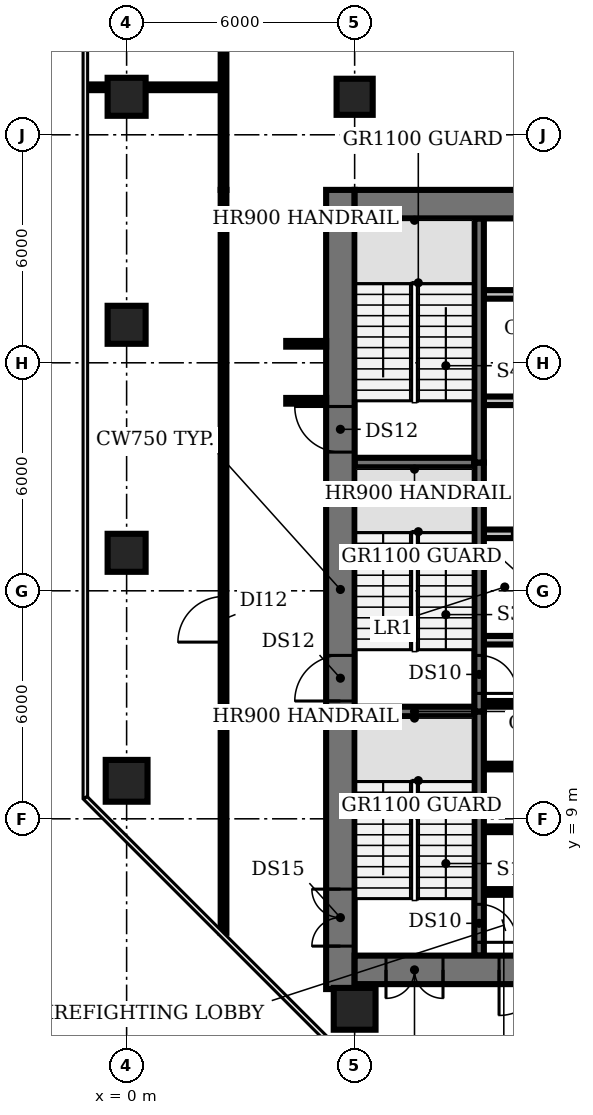
"""IFC4 building model, lengths in metres.
Left out: names, types, materials, properties, quantities, classifications, styles, units other than length and angle.
Written with IfcOpenShell. Run it as: python <this file> out.ifc"""

import sys

from ifc_helpers import new_model, si_unit, direction, frame, frame_2d, origin, origin_2d, place, context, subcontext, project, spatial, rectangle, circle, extrude, element, fill, save


model = new_model("IFC4")
c1 = context("Model", 3, precision=1e-05, world=origin(), true_north=direction((0.0, 1.0)))
c2 = subcontext(c1, "Body", "Model", "MODEL_VIEW")
j1 = project(units=[si_unit("LENGTHUNIT", "METRE"), si_unit("PLANEANGLEUNIT", "RADIAN")], contexts=[c1])
p1 = place(None, origin())
s1 = spatial("IfcSite", under=j1, at=p1, CompositionType="ELEMENT")
p2 = place(p1, origin())
s2 = spatial("IfcBuilding", under=s1, at=p2, CompositionType="ELEMENT")
p3 = place(p2, frame((0.0, 0.0, 87.8)))
s3 = spatial("IfcBuildingStorey", under=s2, at=p3, CompositionType="ELEMENT", Elevation=87.8)
p4 = place(p3, frame((0.0, 10.0, -0.35), z_axis=(0.0, 0.0, 1.0), x_axis=(1.0, 0.0, 0.0)))
e1 = element("IfcColumn", 1, at=p4, inside=s3, PredefinedType="COLUMN", context=c2, shape_type="SweptSolid", body=[
    extrude(circle(Radius=0.55, at=origin_2d()), origin(), (0.0, 0.0, 1.0), 4.2),
])
for number, where, z_axis, x_axis in (
    (2, (0.0, 16.0, -0.35), (0.0, 0.0, 1.0), (1.0, 0.0, 0.0)),
    (3, (0.0, 22.0, -0.35), (0.0, 0.0, 1.0), (1.0, 0.0, 0.0)),
    (4, (0.0, 28.0, -0.35), (0.0, 0.0, 1.0), (1.0, 0.0, 0.0)),
):
    element("IfcColumn", number, at=place(p3, frame(where, z_axis=z_axis, x_axis=x_axis)), inside=s3, PredefinedType="COLUMN", context=c2, shape_type="SweptSolid", body=[
        extrude(rectangle(XDim=1.0, YDim=1.0, at=origin_2d()), origin(), (0.0, 0.0, 1.0), 4.2),
    ])
p5 = place(p3, frame((6.0, 4.0, -0.35), z_axis=(0.0, 0.0, 1.0), x_axis=(1.0, 0.0, 0.0)))
e5 = element("IfcColumn", 5, at=p5, inside=s3, PredefinedType="COLUMN", context=c2, shape_type="SweptSolid", body=[
    extrude(circle(Radius=0.55, at=origin_2d()), origin(), (0.0, 0.0, 1.0), 4.2),
])
p6 = place(p3, frame((6.0, 28.0, -0.35), z_axis=(0.0, 0.0, 1.0), x_axis=(1.0, 0.0, 0.0)))
e6 = element("IfcColumn", 6, at=p6, inside=s3, PredefinedType="COLUMN", context=c2, shape_type="SweptSolid", body=[
    extrude(rectangle(XDim=0.95, YDim=0.95, at=origin_2d()), origin(), (0.0, 0.0, 1.0), 4.2),
])
for number, where, z_axis, x_axis in (
    (7, (9.4, 7.075, 0.0), (0.0, 0.0, 1.0), (1.0, 0.0, 0.0)),
    (8, (9.4, 8.725, 0.0), (0.0, 0.0, 1.0), (1.0, 0.0, 0.0)),
    (9, (9.4, 10.375, 0.0), (0.0, 0.0, 1.0), (1.0, 0.0, 0.0)),
):
    element("IfcWall", number, at=place(p3, frame(where, z_axis=z_axis, x_axis=x_axis)), inside=s3, PredefinedType="SHEAR", context=c2, shape_type="SweptSolid", body=[
        extrude(rectangle(XDim=1.05, YDim=0.15, at=frame_2d((0.525, 0.0))), origin(), (0.0, 0.0, 1.0), 3.85),
    ])
p7 = place(p3, frame((6.0, 11.825, 0.0), z_axis=(0.0, 0.0, 1.0), x_axis=(1.0, 0.0, 0.0)))
e10 = element("IfcWall", 10, at=p7, inside=s3, PredefinedType="SHEAR", context=c2, shape_type="SweptSolid", body=[
    extrude(rectangle(XDim=3.15, YDim=0.25, at=frame_2d((1.575, 0.0))), origin(), (0.0, 0.0, 1.0), 3.85),
])
p8 = place(p3, frame((9.4, 12.025, 0.0), z_axis=(0.0, 0.0, 1.0), x_axis=(1.0, 0.0, 0.0)))
e11 = element("IfcWall", 11, at=p8, inside=s3, PredefinedType="SHEAR", context=c2, shape_type="SweptSolid", body=[
    extrude(rectangle(XDim=1.05, YDim=0.15, at=frame_2d((0.525, 0.0))), origin(), (0.0, 0.0, 1.0), 3.85),
])
p9 = place(p3, frame((9.4, 13.7, 0.0), z_axis=(0.0, 0.0, 1.0), x_axis=(1.0, 0.0, 0.0)))
e12 = element("IfcWall", 12, at=p9, inside=s3, PredefinedType="PARTITIONING", context=c2, shape_type="SweptSolid", body=[
    extrude(rectangle(XDim=4.0, YDim=0.225, at=frame_2d((2.0, 0.0))), origin(), (0.0, 0.0, 1.0), 3.85),
])
p10 = place(p3, frame((9.4, 16.5, 0.0), z_axis=(0.0, 0.0, 1.0), x_axis=(1.0, 0.0, 0.0)))
e13 = element("IfcWall", 13, at=p10, inside=s3, PredefinedType="PARTITIONING", context=c2, shape_type="SweptSolid", body=[
    extrude(rectangle(XDim=14.6, YDim=0.225, at=frame_2d((7.3, 0.0))), origin(), (0.0, 0.0, 1.0), 3.85),
])
p11 = place(p10, frame((0.75, 0.0, 0.0)))
e14 = element("IfcOpeningElement", 14, at=p11, cuts=e13, PredefinedType="OPENING", context=c2, shape_type="SweptSolid", body=[
    extrude(rectangle(XDim=1.1, YDim=2.1, at=frame_2d((0.55, 1.05))), frame((0.0, 0.123, 0.0), z_axis=(0.0, -1.0, 0.0), x_axis=(1.0, 0.0, 0.0)), (0.0, 0.0, 1.0), 0.245),
])
p12 = place(p10, frame((3.55, 0.0, 0.0)))
e15 = element("IfcOpeningElement", 15, at=p12, cuts=e13, PredefinedType="OPENING", context=c2, shape_type="SweptSolid", body=[
    extrude(rectangle(XDim=1.1, YDim=2.1, at=frame_2d((0.55, 1.05))), frame((0.0, 0.123, 0.0), z_axis=(0.0, -1.0, 0.0), x_axis=(1.0, 0.0, 0.0)), (0.0, 0.0, 1.0), 0.245),
])
p13 = place(p10, frame((6.35, 0.0, 0.0)))
e16 = element("IfcOpeningElement", 16, at=p13, cuts=e13, PredefinedType="OPENING", context=c2, shape_type="SweptSolid", body=[
    extrude(rectangle(XDim=1.1, YDim=2.1, at=frame_2d((0.55, 1.05))), frame((0.0, 0.123, 0.0), z_axis=(0.0, -1.0, 0.0), x_axis=(1.0, 0.0, 0.0)), (0.0, 0.0, 1.0), 0.245),
])
p14 = place(p10, frame((9.15, 0.0, 0.0)))
e17 = element("IfcOpeningElement", 17, at=p14, cuts=e13, PredefinedType="OPENING", context=c2, shape_type="SweptSolid", body=[
    extrude(rectangle(XDim=1.1, YDim=2.1, at=frame_2d((0.55, 1.05))), frame((0.0, 0.123, 0.0), z_axis=(0.0, -1.0, 0.0), x_axis=(1.0, 0.0, 0.0)), (0.0, 0.0, 1.0), 0.245),
])
p15 = place(p10, frame((12.4, 0.0, 0.0)))
e18 = element("IfcOpeningElement", 18, at=p15, cuts=e13, PredefinedType="OPENING", context=c2, shape_type="SweptSolid", body=[
    extrude(rectangle(XDim=1.0, YDim=2.1, at=frame_2d((0.5, 1.05))), frame((0.0, 0.123, 0.0), z_axis=(0.0, -1.0, 0.0), x_axis=(1.0, 0.0, 0.0)), (0.0, 0.0, 1.0), 0.245),
])
p16 = place(p3, frame((6.0, 18.375, 0.0), z_axis=(0.0, 0.0, 1.0), x_axis=(1.0, 0.0, 0.0)))
e19 = element("IfcWall", 19, at=p16, inside=s3, PredefinedType="SHEAR", context=c2, shape_type="SweptSolid", body=[
    extrude(rectangle(XDim=3.15, YDim=0.25, at=frame_2d((1.575, 0.0))), origin(), (0.0, 0.0, 1.0), 3.85),
])
p17 = place(p3, frame((24.0, 20.0, 0.0), z_axis=(0.0, 0.0, 1.0), x_axis=(-1.0, 0.0, 0.0)))
e20 = element("IfcWall", 20, at=p17, inside=s3, PredefinedType="PARTITIONING", context=c2, shape_type="SweptSolid", body=[
    extrude(rectangle(XDim=14.6, YDim=0.225, at=frame_2d((7.3, 0.0))), origin(), (0.0, 0.0, 1.0), 3.85),
])
p18 = place(p17, frame((12.2, 0.0, 0.0)))
e21 = element("IfcOpeningElement", 21, at=p18, cuts=e20, PredefinedType="OPENING", context=c2, shape_type="SweptSolid", body=[
    extrude(rectangle(XDim=1.0, YDim=2.1, at=frame_2d((0.5, 1.05))), frame((0.0, 0.123, 0.0), z_axis=(0.0, -1.0, 0.0), x_axis=(1.0, 0.0, 0.0)), (0.0, 0.0, 1.0), 0.245),
])
p19 = place(p17, frame((9.025, 0.0, 0.0)))
e22 = element("IfcOpeningElement", 22, at=p19, cuts=e20, PredefinedType="OPENING", context=c2, shape_type="SweptSolid", body=[
    extrude(rectangle(XDim=0.9, YDim=2.1, at=frame_2d((0.45, 1.05))), frame((0.0, 0.123, 0.0), z_axis=(0.0, -1.0, 0.0), x_axis=(1.0, 0.0, 0.0)), (0.0, 0.0, 1.0), 0.245),
])
p20 = place(p17, frame((5.375, 0.0, 0.0)))
e23 = element("IfcOpeningElement", 23, at=p20, cuts=e20, PredefinedType="OPENING", context=c2, shape_type="SweptSolid", body=[
    extrude(rectangle(XDim=1.0, YDim=2.1, at=frame_2d((0.5, 1.05))), frame((0.0, 0.123, 0.0), z_axis=(0.0, -1.0, 0.0), x_axis=(1.0, 0.0, 0.0)), (0.0, 0.0, 1.0), 0.245),
])
p21 = place(p17, frame((1.2, 0.0, 0.0)))
e24 = element("IfcOpeningElement", 24, at=p21, cuts=e20, PredefinedType="OPENING", context=c2, shape_type="SweptSolid", body=[
    extrude(rectangle(XDim=1.0, YDim=2.1, at=frame_2d((0.5, 1.05))), frame((0.0, 0.123, 0.0), z_axis=(0.0, -1.0, 0.0), x_axis=(1.0, 0.0, 0.0)), (0.0, 0.0, 1.0), 0.245),
])
p22 = place(p3, frame((9.4, 22.8, 0.0), z_axis=(0.0, 0.0, 1.0), x_axis=(1.0, 0.0, 0.0)))
e25 = element("IfcWall", 25, at=p22, inside=s3, PredefinedType="PARTITIONING", context=c2, shape_type="SweptSolid", body=[
    extrude(rectangle(XDim=14.6, YDim=0.225, at=frame_2d((7.3, 0.0))), origin(), (0.0, 0.0, 1.0), 3.85),
])
p23 = place(p3, frame((9.275, 11.825, 0.0), z_axis=(0.0, 0.0, 1.0), x_axis=(0.0, -1.0, 0.0)))
e26 = element("IfcWall", 26, at=p23, inside=s3, PredefinedType="SHEAR", context=c2, shape_type="SweptSolid", body=[
    extrude(rectangle(XDim=6.425, YDim=0.25, at=frame_2d((3.212, 0.0))), origin(), (0.0, 0.0, 1.0), 3.85),
])
p24 = place(p23, frame((5.075, 0.0, 0.0)))
e27 = element("IfcOpeningElement", 27, at=p24, cuts=e26, PredefinedType="OPENING", context=c2, shape_type="SweptSolid", body=[
    extrude(rectangle(XDim=1.0, YDim=2.1, at=frame_2d((0.5, 1.05))), frame((0.0, 0.135, 0.0), z_axis=(0.0, -1.0, 0.0), x_axis=(1.0, 0.0, 0.0)), (0.0, 0.0, 1.0), 0.27),
])
p25 = place(p3, frame((9.275, 18.375, 0.0), z_axis=(0.0, 0.0, 1.0), x_axis=(0.0, -1.0, 0.0)))
e28 = element("IfcWall", 28, at=p25, inside=s3, PredefinedType="SHEAR", context=c2, shape_type="SweptSolid", body=[
    extrude(rectangle(XDim=6.55, YDim=0.25, at=frame_2d((3.275, 0.0))), origin(), (0.0, 0.0, 1.0), 3.85),
])
p26 = place(p25, frame((5.075, 0.0, 0.0)))
e29 = element("IfcOpeningElement", 29, at=p26, cuts=e28, PredefinedType="OPENING", context=c2, shape_type="SweptSolid", body=[
    extrude(rectangle(XDim=1.0, YDim=2.1, at=frame_2d((0.5, 1.05))), frame((0.0, 0.135, 0.0), z_axis=(0.0, -1.0, 0.0), x_axis=(1.0, 0.0, 0.0)), (0.0, 0.0, 1.0), 0.27),
])
p27 = place(p3, frame((9.275, 18.375, 0.0), z_axis=(0.0, 0.0, 1.0), x_axis=(0.0, 1.0, 0.0)))
e30 = element("IfcWall", 30, at=p27, inside=s3, PredefinedType="SHEAR", context=c2, shape_type="SweptSolid", body=[
    extrude(rectangle(XDim=6.425, YDim=0.25, at=frame_2d((3.212, 0.0))), origin(), (0.0, 0.0, 1.0), 3.85),
])
p28 = place(p3, frame((5.625, 4.52, 0.0), z_axis=(0.0, 0.0, 1.0), x_axis=(0.0, 1.0, 0.0)))
e31 = element("IfcWall", 31, at=p28, inside=s3, PredefinedType="SHEAR", context=c2, shape_type="SweptSolid", body=[
    extrude(rectangle(XDim=21.03, YDim=0.75, at=frame_2d((10.515, 0.0))), origin(), (0.0, 0.0, 1.0), 3.85),
])
p29 = place(p28, frame((1.13, 0.0, 0.0)))
e32 = element("IfcOpeningElement", 32, at=p29, cuts=e31, PredefinedType="OPENING", context=c2, shape_type="SweptSolid", body=[
    extrude(rectangle(XDim=1.5, YDim=2.1, at=frame_2d((0.75, 1.05))), frame((0.0, 0.385, 0.0), z_axis=(0.0, -1.0, 0.0), x_axis=(1.0, 0.0, 0.0)), (0.0, 0.0, 1.0), 0.77),
])
p30 = place(p28, frame((7.58, 0.0, 0.0)))
e33 = element("IfcOpeningElement", 33, at=p30, cuts=e31, PredefinedType="OPENING", context=c2, shape_type="SweptSolid", body=[
    extrude(rectangle(XDim=1.2, YDim=2.1, at=frame_2d((0.6, 1.05))), frame((0.0, 0.385, 0.0), z_axis=(0.0, -1.0, 0.0), x_axis=(1.0, 0.0, 0.0)), (0.0, 0.0, 1.0), 0.77),
])
p31 = place(p28, frame((14.13, 0.0, 0.0)))
e34 = element("IfcOpeningElement", 34, at=p31, cuts=e31, PredefinedType="OPENING", context=c2, shape_type="SweptSolid", body=[
    extrude(rectangle(XDim=1.2, YDim=2.1, at=frame_2d((0.6, 1.05))), frame((0.0, 0.385, 0.0), z_axis=(0.0, -1.0, 0.0), x_axis=(1.0, 0.0, 0.0)), (0.0, 0.0, 1.0), 0.77),
])
p32 = place(p3, frame((24.0, 5.025, 0.0), z_axis=(0.0, 0.0, 1.0), x_axis=(-1.0, 0.0, 0.0)))
e35 = element("IfcWall", 35, at=p32, inside=s3, PredefinedType="SHEAR", context=c2, shape_type="SweptSolid", body=[
    extrude(rectangle(XDim=18.0, YDim=0.75, at=frame_2d((9.0, 0.0))), origin(), (0.0, 0.0, 1.0), 3.85),
])
p33 = place(p32, frame((0.825, 0.0, 0.0)))
e36 = element("IfcOpeningElement", 36, at=p33, cuts=e35, PredefinedType="OPENING", context=c2, shape_type="SweptSolid", body=[
    extrude(rectangle(XDim=1.5, YDim=2.1, at=frame_2d((0.75, 1.05))), frame((0.0, 0.385, 0.0), z_axis=(0.0, -1.0, 0.0), x_axis=(1.0, 0.0, 0.0)), (0.0, 0.0, 1.0), 0.77),
])
p34 = place(p32, frame((15.675, 0.0, 0.0)))
e37 = element("IfcOpeningElement", 37, at=p34, cuts=e35, PredefinedType="OPENING", context=c2, shape_type="SweptSolid", body=[
    extrude(rectangle(XDim=1.5, YDim=2.1, at=frame_2d((0.75, 1.05))), frame((0.0, 0.385, 0.0), z_axis=(0.0, -1.0, 0.0), x_axis=(1.0, 0.0, 0.0)), (0.0, 0.0, 1.0), 0.77),
])
p35 = place(p32, frame((13.0, 0.0, 0.0)))
e38 = element("IfcOpeningElement", 38, at=p35, cuts=e35, PredefinedType="OPENING", context=c2, shape_type="SweptSolid", body=[
    extrude(rectangle(XDim=1.2, YDim=2.1, at=frame_2d((0.6, 1.05))), frame((0.0, 0.385, 0.0), z_axis=(0.0, -1.0, 0.0), x_axis=(1.0, 0.0, 0.0)), (0.0, 0.0, 1.0), 0.77),
])
p36 = place(p32, frame((4.3, 0.0, 0.0)))
e39 = element("IfcOpeningElement", 39, at=p36, cuts=e35, PredefinedType="OPENING", context=c2, shape_type="SweptSolid", body=[
    extrude(rectangle(XDim=1.0, YDim=2.1, at=frame_2d((0.5, 1.05))), frame((0.0, 0.385, 0.0), z_axis=(0.0, -1.0, 0.0), x_axis=(1.0, 0.0, 0.0)), (0.0, 0.0, 1.0), 0.77),
])
p37 = place(p3, frame((6.0, 25.175, 0.0), z_axis=(0.0, 0.0, 1.0), x_axis=(1.0, 0.0, 0.0)))
e40 = element("IfcWall", 40, at=p37, inside=s3, PredefinedType="SHEAR", context=c2, shape_type="SweptSolid", body=[
    extrude(rectangle(XDim=18.0, YDim=0.75, at=frame_2d((9.0, 0.0))), origin(), (0.0, 0.0, 1.0), 3.85),
])
p38 = place(p3, frame((-1.04, 28.25, 0.0), z_axis=(0.0, 0.0, 1.0), x_axis=(1.0, 0.0, 0.0)))
e41 = element("IfcWall", 41, at=p38, inside=s3, PredefinedType="PARTITIONING", context=c2, shape_type="SweptSolid", body=[
    extrude(rectangle(XDim=3.59, YDim=0.15, at=frame_2d((1.795, 0.0))), origin(), (0.0, 0.0, 1.0), 2.83),
])
p39 = place(p3, frame((2.55, 5.999, 0.0), z_axis=(0.0, 0.0, 1.0), x_axis=(0.0, 1.0, 0.0)))
e42 = element("IfcWall", 42, at=p39, inside=s3, PredefinedType="PARTITIONING", context=c2, shape_type="SweptSolid", body=[
    extrude(rectangle(XDim=19.551, YDim=0.15, at=frame_2d((9.775, 0.0))), origin(), (0.0, 0.0, 1.0), 2.83),
])
p40 = place(p39, frame((7.651, 0.0, 0.0)))
e43 = element("IfcOpeningElement", 43, at=p40, cuts=e42, PredefinedType="OPENING", context=c2, shape_type="SweptSolid", body=[
    extrude(rectangle(XDim=1.2, YDim=2.1, at=frame_2d((0.6, 1.05))), frame((0.0, 0.085, 0.0), z_axis=(0.0, -1.0, 0.0), x_axis=(1.0, 0.0, 0.0)), (0.0, 0.0, 1.0), 0.17),
])
p41 = place(p3, frame((2.55, 25.55, 0.0), z_axis=(0.0, 0.0, 1.0), x_axis=(0.0, 1.0, 0.0)))
e44 = element("IfcWall", 44, at=p41, inside=s3, PredefinedType="PARTITIONING", context=c2, shape_type="SweptSolid", body=[
    extrude(rectangle(XDim=3.9, YDim=0.15, at=frame_2d((1.95, 0.0))), origin(), (0.0, 0.0, 1.0), 2.83),
])
for number, where, z_axis, x_axis in (
    (45, (4.2, 20.0, 0.0), (0.0, 0.0, 1.0), (1.0, 0.0, 0.0)),
    (46, (4.2, 21.5, 0.0), (0.0, 0.0, 1.0), (1.0, 0.0, 0.0)),
):
    element("IfcWall", number, at=place(p3, frame(where, z_axis=z_axis, x_axis=x_axis)), inside=s3, PredefinedType="PARTITIONING", context=c2, shape_type="SweptSolid", body=[
        extrude(rectangle(XDim=1.05, YDim=0.15, at=frame_2d((0.525, 0.0))), origin(), (0.0, 0.0, 1.0), 2.83),
    ])
p42 = place(p24, origin())
e47 = element("IfcDoor", 47, at=p42, inside=s3, OperationType="SINGLE_SWING_RIGHT", PredefinedType="DOOR", context=c2, shape_type="SweptSolid", body=[
    extrude(rectangle(XDim=1.0, YDim=2.1, at=frame_2d((0.5, 1.05))), frame((0.0, 0.025, 0.0), z_axis=(0.0, -1.0, 0.0), x_axis=(1.0, 0.0, 0.0)), (0.0, 0.0, 1.0), 0.05),
])
fill(e27, e47)
p43 = place(p26, origin())
e48 = element("IfcDoor", 48, at=p43, inside=s3, OperationType="SINGLE_SWING_RIGHT", PredefinedType="DOOR", context=c2, shape_type="SweptSolid", body=[
    extrude(rectangle(XDim=1.0, YDim=2.1, at=frame_2d((0.5, 1.05))), frame((0.0, 0.025, 0.0), z_axis=(0.0, -1.0, 0.0), x_axis=(1.0, 0.0, 0.0)), (0.0, 0.0, 1.0), 0.05),
])
fill(e29, e48)
p44 = place(p29, origin())
e49 = element("IfcDoor", 49, at=p44, inside=s3, OperationType="DOUBLE_DOOR_SINGLE_SWING", PredefinedType="DOOR", context=c2, shape_type="SweptSolid", body=[
    extrude(rectangle(XDim=1.5, YDim=2.1, at=frame_2d((0.75, 1.05))), frame((0.0, 0.025, 0.0), z_axis=(0.0, -1.0, 0.0), x_axis=(1.0, 0.0, 0.0)), (0.0, 0.0, 1.0), 0.05),
])
fill(e32, e49)
p45 = place(p30, origin())
e50 = element("IfcDoor", 50, at=p45, inside=s3, OperationType="SINGLE_SWING_LEFT", PredefinedType="DOOR", context=c2, shape_type="SweptSolid", body=[
    extrude(rectangle(XDim=1.2, YDim=2.1, at=frame_2d((0.6, 1.05))), frame((0.0, 0.025, 0.0), z_axis=(0.0, -1.0, 0.0), x_axis=(1.0, 0.0, 0.0)), (0.0, 0.0, 1.0), 0.05),
])
fill(e33, e50)
p46 = place(p31, origin())
e51 = element("IfcDoor", 51, at=p46, inside=s3, OperationType="SINGLE_SWING_RIGHT", PredefinedType="DOOR", context=c2, shape_type="SweptSolid", body=[
    extrude(rectangle(XDim=1.2, YDim=2.1, at=frame_2d((0.6, 1.05))), frame((0.0, 0.025, 0.0), z_axis=(0.0, -1.0, 0.0), x_axis=(1.0, 0.0, 0.0)), (0.0, 0.0, 1.0), 0.05),
])
fill(e34, e51)
p47 = place(p34, origin())
e52 = element("IfcDoor", 52, at=p47, inside=s3, OperationType="DOUBLE_DOOR_SINGLE_SWING", PredefinedType="DOOR", context=c2, shape_type="SweptSolid", body=[
    extrude(rectangle(XDim=1.5, YDim=2.1, at=frame_2d((0.75, 1.05))), frame((0.0, 0.025, 0.0), z_axis=(0.0, -1.0, 0.0), x_axis=(1.0, 0.0, 0.0)), (0.0, 0.0, 1.0), 0.05),
])
fill(e37, e52)
p48 = place(p35, origin())
e53 = element("IfcDoor", 53, at=p48, inside=s3, OperationType="SINGLE_SWING_RIGHT", PredefinedType="DOOR", context=c2, shape_type="SweptSolid", body=[
    extrude(rectangle(XDim=1.2, YDim=2.1, at=frame_2d((0.6, 1.05))), frame((0.0, 0.025, 0.0), z_axis=(0.0, -1.0, 0.0), x_axis=(1.0, 0.0, 0.0)), (0.0, 0.0, 1.0), 0.05),
])
fill(e38, e53)
p49 = place(p40, origin())
e54 = element("IfcDoor", 54, at=p49, inside=s3, OperationType="SINGLE_SWING_LEFT", PredefinedType="DOOR", context=c2, shape_type="SweptSolid", body=[
    extrude(rectangle(XDim=1.2, YDim=2.1, at=frame_2d((0.6, 1.05))), frame((0.0, 0.025, 0.0), z_axis=(0.0, -1.0, 0.0), x_axis=(1.0, 0.0, 0.0)), (0.0, 0.0, 1.0), 0.05),
])
fill(e43, e54)
save(model, sys.argv[1])
